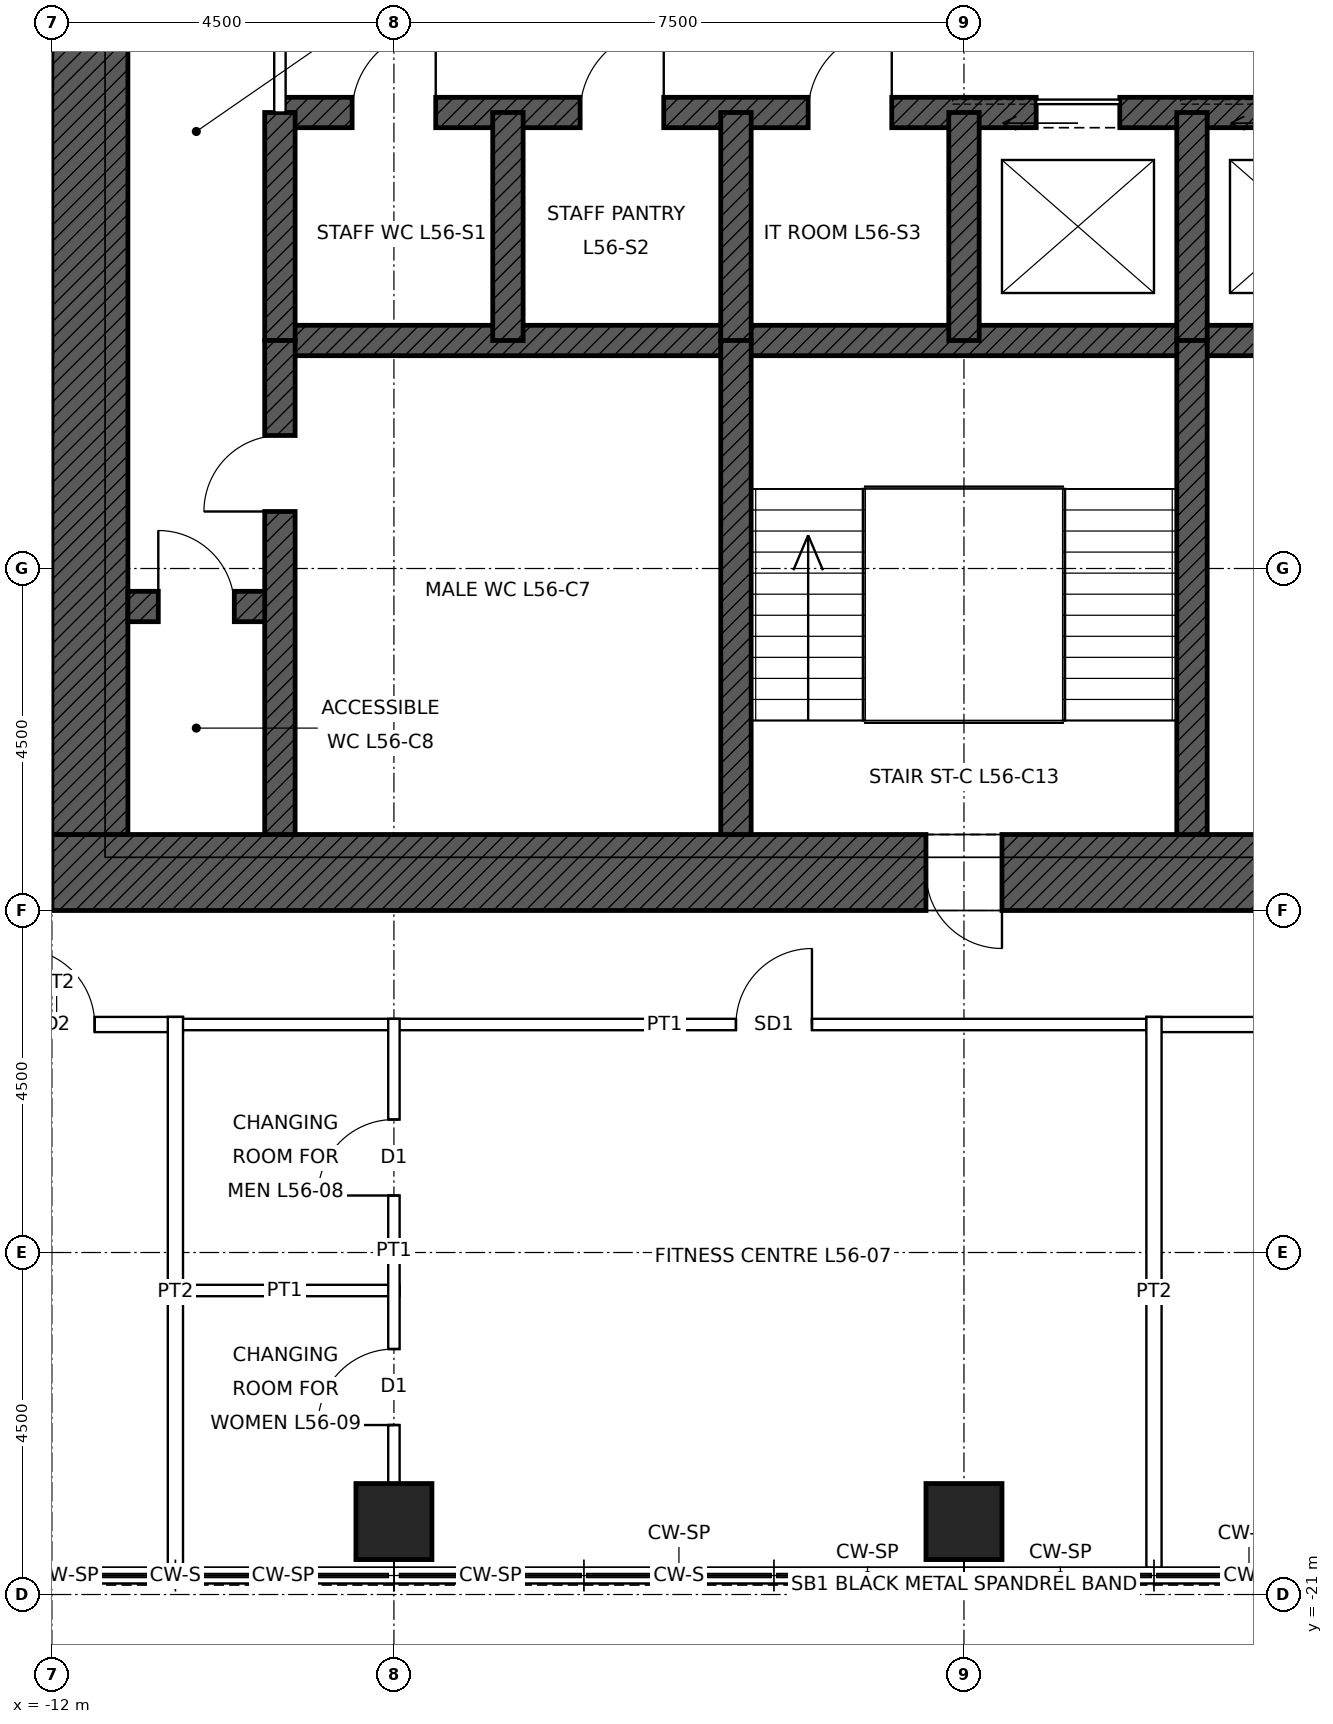
"""IFC4 building model, lengths in metres.
Left out: names, types, materials, properties, quantities, classifications, styles, units other than length and angle.
Written with IfcOpenShell. Run it as: python <this file> out.ifc"""

import sys

from ifc_helpers import new_model, si_unit, direction, frame, frame_2d, origin, origin_2d, place, context, subcontext, project, spatial, rectangle, hollow_rectangle, extrude, element, fill, save


model = new_model("IFC4")
c1 = context("Model", 3, precision=1e-05, world=origin(), true_north=direction((0.0, 1.0)))
c2 = subcontext(c1, "Body", "Model", "MODEL_VIEW")
j1 = project(units=[si_unit("LENGTHUNIT", "METRE"), si_unit("PLANEANGLEUNIT", "RADIAN")], contexts=[c1])
p1 = place(None, origin())
s1 = spatial("IfcSite", under=j1, at=p1, CompositionType="ELEMENT")
p2 = place(p1, origin())
s2 = spatial("IfcBuilding", under=s1, at=p2, CompositionType="ELEMENT")
p3 = place(p2, frame((0.0, 0.0, 259.9)))
s3 = spatial("IfcBuildingStorey", under=s2, at=p3, CompositionType="ELEMENT", Elevation=259.9)
for number, where, z_axis, x_axis in (
    (1, (0.0, -20.04, 0.0), (0.0, 0.0, 1.0), (1.0, 0.0, 0.0)),
    (2, (-7.5, -20.04, 0.0), (0.0, 0.0, 1.0), (1.0, 0.0, 0.0)),
):
    element("IfcColumn", number, at=place(p3, frame(where, z_axis=z_axis, x_axis=x_axis)), inside=s3, PredefinedType="COLUMN", context=c2, shape_type="SweptSolid", body=[
        extrude(hollow_rectangle(XDim=1.0, YDim=1.0, WallThickness=0.075, at=origin_2d()), origin(), (0.0, 0.0, 1.0), 4.0),
    ])
p4 = place(p3, frame((12.0, -11.5, 0.0), z_axis=(0.0, 0.0, 1.0), x_axis=(-1.0, 0.0, 0.0)))
e3 = element("IfcWall", 3, at=p4, inside=s3, PredefinedType="SHEAR", context=c2, shape_type="SweptSolid", body=[
    extrude(rectangle(XDim=24.0, YDim=1.0, at=frame_2d((12.0, 0.0))), origin(), (0.0, 0.0, 1.0), 4.0),
])
p5 = place(p4, frame((11.5, 0.0, 0.0)))
e4 = element("IfcOpeningElement", 4, at=p5, cuts=e3, PredefinedType="OPENING", context=c2, shape_type="SweptSolid", body=[
    extrude(rectangle(XDim=1.0, YDim=2.1, at=frame_2d((0.5, 1.05))), frame((0.0, 0.51, 0.0), z_axis=(0.0, -1.0, 0.0), x_axis=(1.0, 0.0, 0.0)), (0.0, 0.0, 1.0), 1.02),
])
p6 = place(p4, frame((1.0, 0.0, 0.0)))
e5 = element("IfcOpeningElement", 5, at=p6, cuts=e3, PredefinedType="OPENING", context=c2, shape_type="SweptSolid", body=[
    extrude(rectangle(XDim=1.0, YDim=2.4, at=frame_2d((0.5, 1.2))), frame((0.0, 0.51, 0.0), z_axis=(0.0, -1.0, 0.0), x_axis=(1.0, 0.0, 0.0)), (0.0, 0.0, 1.0), 1.02),
])
p7 = place(p3, frame((-11.5, -11.0, 0.0), z_axis=(0.0, 0.0, 1.0), x_axis=(0.0, 1.0, 0.0)))
e6 = element("IfcWall", 6, at=p7, inside=s3, PredefinedType="SHEAR", context=c2, shape_type="SweptSolid", body=[
    extrude(rectangle(XDim=22.0, YDim=1.0, at=frame_2d((11.0, 0.0))), origin(), (0.0, 0.0, 1.0), 4.0),
])
p8 = place(p7, frame((10.5, 0.0, 0.0)))
e7 = element("IfcOpeningElement", 7, at=p8, cuts=e6, PredefinedType="OPENING", context=c2, shape_type="SweptSolid", body=[
    extrude(rectangle(XDim=1.0, YDim=2.4, at=frame_2d((0.5, 1.2))), frame((0.0, 0.51, 0.0), z_axis=(0.0, -1.0, 0.0), x_axis=(1.0, 0.0, 0.0)), (0.0, 0.0, 1.0), 1.02),
])
p9 = place(p3, frame((-9.0, -1.5, 0.0), z_axis=(0.0, 0.0, 1.0), x_axis=(1.0, 0.0, 0.0)))
e8 = element("IfcWall", 8, at=p9, inside=s3, PredefinedType="SHEAR", context=c2, shape_type="SweptSolid", body=[
    extrude(rectangle(XDim=18.0, YDim=0.4, at=frame_2d((9.0, 0.0))), origin(), (0.0, 0.0, 1.0), 4.0),
])
p10 = place(p9, frame((9.95, 0.0, 0.0)))
e9 = element("IfcOpeningElement", 9, at=p10, cuts=e8, PredefinedType="OPENING", context=c2, shape_type="SweptSolid", body=[
    extrude(rectangle(XDim=1.1, YDim=2.1, at=frame_2d((0.55, 1.05))), frame((0.0, 0.21, 0.0), z_axis=(0.0, -1.0, 0.0), x_axis=(1.0, 0.0, 0.0)), (0.0, 0.0, 1.0), 0.42),
])
p11 = place(p9, frame((12.95, 0.0, 0.0)))
e10 = element("IfcOpeningElement", 10, at=p11, cuts=e8, PredefinedType="OPENING", context=c2, shape_type="SweptSolid", body=[
    extrude(rectangle(XDim=1.1, YDim=2.1, at=frame_2d((0.55, 1.05))), frame((0.0, 0.21, 0.0), z_axis=(0.0, -1.0, 0.0), x_axis=(1.0, 0.0, 0.0)), (0.0, 0.0, 1.0), 0.42),
])
p12 = place(p9, frame((15.95, 0.0, 0.0)))
e11 = element("IfcOpeningElement", 11, at=p12, cuts=e8, PredefinedType="OPENING", context=c2, shape_type="SweptSolid", body=[
    extrude(rectangle(XDim=1.1, YDim=2.1, at=frame_2d((0.55, 1.05))), frame((0.0, 0.21, 0.0), z_axis=(0.0, -1.0, 0.0), x_axis=(1.0, 0.0, 0.0)), (0.0, 0.0, 1.0), 0.42),
])
p13 = place(p9, frame((0.95, 0.0, 0.0)))
e12 = element("IfcOpeningElement", 12, at=p13, cuts=e8, PredefinedType="OPENING", context=c2, shape_type="SweptSolid", body=[
    extrude(rectangle(XDim=1.1, YDim=2.1, at=frame_2d((0.55, 1.05))), frame((0.0, 0.21, 0.0), z_axis=(0.0, -1.0, 0.0), x_axis=(1.0, 0.0, 0.0)), (0.0, 0.0, 1.0), 0.42),
])
p14 = place(p9, frame((3.95, 0.0, 0.0)))
e13 = element("IfcOpeningElement", 13, at=p14, cuts=e8, PredefinedType="OPENING", context=c2, shape_type="SweptSolid", body=[
    extrude(rectangle(XDim=1.1, YDim=2.1, at=frame_2d((0.55, 1.05))), frame((0.0, 0.21, 0.0), z_axis=(0.0, -1.0, 0.0), x_axis=(1.0, 0.0, 0.0)), (0.0, 0.0, 1.0), 0.42),
])
p15 = place(p9, frame((6.95, 0.0, 0.0)))
e14 = element("IfcOpeningElement", 14, at=p15, cuts=e8, PredefinedType="OPENING", context=c2, shape_type="SweptSolid", body=[
    extrude(rectangle(XDim=1.1, YDim=2.1, at=frame_2d((0.55, 1.05))), frame((0.0, 0.21, 0.0), z_axis=(0.0, -1.0, 0.0), x_axis=(1.0, 0.0, 0.0)), (0.0, 0.0, 1.0), 0.42),
])
p16 = place(p3, frame((-9.0, -4.5, 0.0), z_axis=(0.0, 0.0, 1.0), x_axis=(1.0, 0.0, 0.0)))
e15 = element("IfcWall", 15, at=p16, inside=s3, PredefinedType="SHEAR", context=c2, shape_type="SweptSolid", body=[
    extrude(rectangle(XDim=18.0, YDim=0.4, at=frame_2d((9.0, 0.0))), origin(), (0.0, 0.0, 1.0), 4.0),
])
p17 = place(p3, frame((-11.0, -8.0, 0.0), z_axis=(0.0, 0.0, 1.0), x_axis=(1.0, 0.0, 0.0)))
e16 = element("IfcWall", 16, at=p17, inside=s3, PredefinedType="SHEAR", context=c2, shape_type="SweptSolid", body=[
    extrude(rectangle(XDim=2.0, YDim=0.4, at=frame_2d((1.0, 0.0))), origin(), (0.0, 0.0, 1.0), 4.0),
])
p18 = place(p17, frame((0.4, 0.0, 0.0)))
e17 = element("IfcOpeningElement", 17, at=p18, cuts=e16, PredefinedType="OPENING", context=c2, shape_type="SweptSolid", body=[
    extrude(rectangle(XDim=1.0, YDim=2.1, at=frame_2d((0.5, 1.05))), frame((0.0, 0.21, 0.0), z_axis=(0.0, -1.0, 0.0), x_axis=(1.0, 0.0, 0.0)), (0.0, 0.0, 1.0), 0.42),
])
for number, where, z_axis, x_axis in (
    (18, (-9.0, -4.5, 0.0), (0.0, 0.0, 1.0), (0.0, 1.0, 0.0)),
    (19, (-6.0, -4.5, 0.0), (0.0, 0.0, 1.0), (0.0, 1.0, 0.0)),
    (20, (-3.0, -4.5, 0.0), (0.0, 0.0, 1.0), (0.0, 1.0, 0.0)),
    (21, (0.0, -4.5, 0.0), (0.0, 0.0, 1.0), (0.0, 1.0, 0.0)),
    (22, (3.0, -4.5, 0.0), (0.0, 0.0, 1.0), (0.0, 1.0, 0.0)),
):
    element("IfcWall", number, at=place(p3, frame(where, z_axis=z_axis, x_axis=x_axis)), inside=s3, PredefinedType="SHEAR", context=c2, shape_type="SweptSolid", body=[
        extrude(rectangle(XDim=3.0, YDim=0.4, at=frame_2d((1.5, 0.0))), origin(), (0.0, 0.0, 1.0), 4.0),
    ])
p19 = place(p3, frame((-9.0, -11.0, 0.0), z_axis=(0.0, 0.0, 1.0), x_axis=(0.0, 1.0, 0.0)))
e23 = element("IfcWall", 23, at=p19, inside=s3, PredefinedType="SHEAR", context=c2, shape_type="SweptSolid", body=[
    extrude(rectangle(XDim=6.5, YDim=0.4, at=frame_2d((3.25, 0.0))), origin(), (0.0, 0.0, 1.0), 4.0),
])
p20 = place(p19, frame((4.25, 0.0, 0.0)))
e24 = element("IfcOpeningElement", 24, at=p20, cuts=e23, PredefinedType="OPENING", context=c2, shape_type="SweptSolid", body=[
    extrude(rectangle(XDim=1.0, YDim=2.1, at=frame_2d((0.5, 1.05))), frame((0.0, 0.21, 0.0), z_axis=(0.0, -1.0, 0.0), x_axis=(1.0, 0.0, 0.0)), (0.0, 0.0, 1.0), 0.42),
])
for number, where, z_axis, x_axis in (
    (25, (-3.0, -11.0, 0.0), (0.0, 0.0, 1.0), (0.0, 1.0, 0.0)),
    (26, (3.0, -11.0, 0.0), (0.0, 0.0, 1.0), (0.0, 1.0, 0.0)),
):
    element("IfcWall", number, at=place(p3, frame(where, z_axis=z_axis, x_axis=x_axis)), inside=s3, PredefinedType="SHEAR", context=c2, shape_type="SweptSolid", body=[
        extrude(rectangle(XDim=6.5, YDim=0.4, at=frame_2d((3.25, 0.0))), origin(), (0.0, 0.0, 1.0), 4.0),
    ])
p21 = place(p3, frame((-10.45, -17.0, 0.0), z_axis=(0.0, 0.0, 1.0), x_axis=(1.0, 0.0, 0.0)))
e27 = element("IfcWall", 27, at=p21, inside=s3, PredefinedType="PARTITIONING", context=c2, shape_type="SweptSolid", body=[
    extrude(rectangle(XDim=3.025, YDim=0.15, at=frame_2d((1.512, 0.0))), origin(), (0.0, 0.0, 1.0), 3.85),
])
p22 = place(p3, frame((-13.6, -13.5, 0.0), z_axis=(0.0, 0.0, 1.0), x_axis=(1.0, 0.0, 0.0)))
e28 = element("IfcWall", 28, at=p22, inside=s3, PredefinedType="PARTITIONING", context=c2, shape_type="SweptSolid", body=[
    extrude(rectangle(XDim=3.325, YDim=0.2, at=frame_2d((1.663, 0.0))), origin(), (0.0, 0.0, 1.0), 3.85),
])
p23 = place(p22, frame((1.163, 0.0, 0.0)))
e29 = element("IfcOpeningElement", 29, at=p23, cuts=e28, PredefinedType="OPENING", context=c2, shape_type="SweptSolid", body=[
    extrude(rectangle(XDim=1.0, YDim=2.1, at=frame_2d((0.5, 1.05))), frame((0.0, 0.11, 0.0), z_axis=(0.0, -1.0, 0.0), x_axis=(1.0, 0.0, 0.0)), (0.0, 0.0, 1.0), 0.22),
])
p24 = place(p3, frame((-10.45, -13.5, 0.0), z_axis=(0.0, 0.0, 1.0), x_axis=(1.0, 0.0, 0.0)))
e30 = element("IfcWall", 30, at=p24, inside=s3, PredefinedType="PARTITIONING", context=c2, shape_type="SweptSolid", body=[
    extrude(rectangle(XDim=13.025, YDim=0.15, at=frame_2d((6.512, 0.0))), origin(), (0.0, 0.0, 1.0), 3.85),
])
p25 = place(p24, frame((7.45, 0.0, 0.0)))
e31 = element("IfcOpeningElement", 31, at=p25, cuts=e30, PredefinedType="OPENING", context=c2, shape_type="SweptSolid", body=[
    extrude(rectangle(XDim=1.0, YDim=2.4, at=frame_2d((0.5, 1.2))), frame((0.0, 0.085, 0.0), z_axis=(0.0, -1.0, 0.0), x_axis=(1.0, 0.0, 0.0)), (0.0, 0.0, 1.0), 0.17),
])
p26 = place(p3, frame((2.4, -13.5, 0.0), z_axis=(0.0, 0.0, 1.0), x_axis=(1.0, 0.0, 0.0)))
e32 = element("IfcWall", 32, at=p26, inside=s3, PredefinedType="PARTITIONING", context=c2, shape_type="SweptSolid", body=[
    extrude(rectangle(XDim=9.7, YDim=0.2, at=frame_2d((4.85, 0.0))), origin(), (0.0, 0.0, 1.0), 3.85),
])
p27 = place(p26, frame((3.538, 0.0, 0.0)))
e33 = element("IfcOpeningElement", 33, at=p27, cuts=e32, PredefinedType="OPENING", context=c2, shape_type="SweptSolid", body=[
    extrude(rectangle(XDim=1.0, YDim=2.1, at=frame_2d((0.5, 1.05))), frame((0.0, 0.11, 0.0), z_axis=(0.0, -1.0, 0.0), x_axis=(1.0, 0.0, 0.0)), (0.0, 0.0, 1.0), 0.22),
])
p28 = place(p3, frame((-10.375, -20.65, 0.0), z_axis=(0.0, 0.0, 1.0), x_axis=(0.0, 1.0, 0.0)))
e34 = element("IfcWall", 34, at=p28, inside=s3, PredefinedType="PARTITIONING", context=c2, shape_type="SweptSolid", body=[
    extrude(rectangle(XDim=7.25, YDim=0.2, at=frame_2d((3.625, 0.0))), origin(), (0.0, 0.0, 1.0), 3.85),
])
p29 = place(p3, frame((-7.5, -19.54, 0.0), z_axis=(0.0, 0.0, 1.0), x_axis=(0.0, 1.0, 0.0)))
e35 = element("IfcWall", 35, at=p29, inside=s3, PredefinedType="PARTITIONING", context=c2, shape_type="SweptSolid", body=[
    extrude(rectangle(XDim=6.115, YDim=0.15, at=frame_2d((3.058, 0.0))), origin(), (0.0, 0.0, 1.0), 3.243),
])
p30 = place(p29, frame((3.79, 0.0, 0.0)))
e36 = element("IfcOpeningElement", 36, at=p30, cuts=e35, PredefinedType="OPENING", context=c2, shape_type="SweptSolid", body=[
    extrude(rectangle(XDim=1.0, YDim=2.1, at=frame_2d((0.5, 1.05))), frame((0.0, 0.085, 0.0), z_axis=(0.0, -1.0, 0.0), x_axis=(1.0, 0.0, 0.0)), (0.0, 0.0, 1.0), 0.17),
])
p31 = place(p29, frame((0.77, 0.0, 0.0)))
e37 = element("IfcOpeningElement", 37, at=p31, cuts=e35, PredefinedType="OPENING", context=c2, shape_type="SweptSolid", body=[
    extrude(rectangle(XDim=1.0, YDim=2.1, at=frame_2d((0.5, 1.05))), frame((0.0, 0.085, 0.0), z_axis=(0.0, -1.0, 0.0), x_axis=(1.0, 0.0, 0.0)), (0.0, 0.0, 1.0), 0.17),
])
p32 = place(p3, frame((2.5, -20.65, 0.0), z_axis=(0.0, 0.0, 1.0), x_axis=(0.0, 1.0, 0.0)))
e38 = element("IfcWall", 38, at=p32, inside=s3, PredefinedType="PARTITIONING", context=c2, shape_type="SweptSolid", body=[
    extrude(rectangle(XDim=7.25, YDim=0.2, at=frame_2d((3.625, 0.0))), origin(), (0.0, 0.0, 1.0), 3.85),
])
p33 = place(p3, frame((-9.0, -1.5, 0.0), z_axis=(0.0, 0.0, 1.0), x_axis=(0.0, 1.0, 0.0)))
e39 = element("IfcWall", 39, at=p33, inside=s3, PredefinedType="PARTITIONING", context=c2, shape_type="SweptSolid", body=[
    extrude(rectangle(XDim=3.0, YDim=0.15, at=frame_2d((1.5, 0.0))), origin(), (0.0, 0.0, 1.0), 3.75),
])
p34 = place(p33, frame((1.0, 0.0, 0.0)))
e40 = element("IfcOpeningElement", 40, at=p34, cuts=e39, PredefinedType="OPENING", context=c2, shape_type="SweptSolid", body=[
    extrude(rectangle(XDim=1.0, YDim=2.4, at=frame_2d((0.5, 1.2))), frame((0.0, 0.085, 0.0), z_axis=(0.0, -1.0, 0.0), x_axis=(1.0, 0.0, 0.0)), (0.0, 0.0, 1.0), 0.17),
])
p35 = place(p5, origin())
e41 = element("IfcDoor", 41, at=p35, inside=s3, OperationType="SINGLE_SWING_LEFT", PredefinedType="DOOR", context=c2, shape_type="SweptSolid", body=[
    extrude(rectangle(XDim=1.0, YDim=2.1, at=frame_2d((0.5, 1.05))), frame((0.0, 0.485, 0.0), z_axis=(0.0, -1.0, 0.0), x_axis=(1.0, 0.0, 0.0)), (0.0, 0.0, 1.0), 0.05),
])
fill(e4, e41)
p36 = place(p20, origin())
e42 = element("IfcDoor", 42, at=p36, inside=s3, OperationType="SINGLE_SWING_LEFT", PredefinedType="DOOR", context=c2, shape_type="SweptSolid", body=[
    extrude(rectangle(XDim=1.0, YDim=2.1, at=frame_2d((0.5, 1.05))), frame((0.0, 0.025, 0.0), z_axis=(0.0, -1.0, 0.0), x_axis=(1.0, 0.0, 0.0)), (0.0, 0.0, 1.0), 0.05),
])
fill(e24, e42)
p37 = place(p18, origin())
e43 = element("IfcDoor", 43, at=p37, inside=s3, OperationType="SINGLE_SWING_LEFT", PredefinedType="DOOR", context=c2, shape_type="SweptSolid", body=[
    extrude(rectangle(XDim=1.0, YDim=2.1, at=frame_2d((0.5, 1.05))), frame((0.0, 0.025, 0.0), z_axis=(0.0, -1.0, 0.0), x_axis=(1.0, 0.0, 0.0)), (0.0, 0.0, 1.0), 0.05),
])
fill(e17, e43)
p38 = place(p10, origin())
e44 = element("IfcDoor", 44, at=p38, inside=s3, OperationType="SLIDING_TO_LEFT", PredefinedType="DOOR", context=c2, shape_type="SweptSolid", body=[
    extrude(rectangle(XDim=1.1, YDim=2.1, at=frame_2d((0.55, 1.05))), frame((0.0, 0.025, 0.0), z_axis=(0.0, -1.0, 0.0), x_axis=(1.0, 0.0, 0.0)), (0.0, 0.0, 1.0), 0.05),
])
fill(e9, e44)
p39 = place(p13, origin())
e45 = element("IfcDoor", 45, at=p39, inside=s3, OperationType="SINGLE_SWING_RIGHT", PredefinedType="DOOR", context=c2, shape_type="SweptSolid", body=[
    extrude(rectangle(XDim=1.1, YDim=2.1, at=frame_2d((0.55, 1.05))), frame((0.0, 0.025, 0.0), z_axis=(0.0, -1.0, 0.0), x_axis=(1.0, 0.0, 0.0)), (0.0, 0.0, 1.0), 0.05),
])
fill(e12, e45)
p40 = place(p14, origin())
e46 = element("IfcDoor", 46, at=p40, inside=s3, OperationType="SINGLE_SWING_RIGHT", PredefinedType="DOOR", context=c2, shape_type="SweptSolid", body=[
    extrude(rectangle(XDim=1.1, YDim=2.1, at=frame_2d((0.55, 1.05))), frame((0.0, 0.025, 0.0), z_axis=(0.0, -1.0, 0.0), x_axis=(1.0, 0.0, 0.0)), (0.0, 0.0, 1.0), 0.05),
])
fill(e13, e46)
p41 = place(p15, origin())
e47 = element("IfcDoor", 47, at=p41, inside=s3, OperationType="SINGLE_SWING_RIGHT", PredefinedType="DOOR", context=c2, shape_type="SweptSolid", body=[
    extrude(rectangle(XDim=1.1, YDim=2.1, at=frame_2d((0.55, 1.05))), frame((0.0, 0.025, 0.0), z_axis=(0.0, -1.0, 0.0), x_axis=(1.0, 0.0, 0.0)), (0.0, 0.0, 1.0), 0.05),
])
fill(e14, e47)
p42 = place(p25, origin())
e48 = element("IfcDoor", 48, at=p42, inside=s3, OperationType="SINGLE_SWING_RIGHT", PredefinedType="DOOR", context=c2, shape_type="SweptSolid", body=[
    extrude(rectangle(XDim=1.0, YDim=2.4, at=frame_2d((0.5, 1.2))), frame((0.0, 0.025, 0.0), z_axis=(0.0, -1.0, 0.0), x_axis=(1.0, 0.0, 0.0)), (0.0, 0.0, 1.0), 0.05),
])
fill(e31, e48)
p43 = place(p30, origin())
e49 = element("IfcDoor", 49, at=p43, inside=s3, OperationType="SINGLE_SWING_LEFT", PredefinedType="DOOR", context=c2, shape_type="SweptSolid", body=[
    extrude(rectangle(XDim=1.0, YDim=2.1, at=frame_2d((0.5, 1.05))), frame((0.0, 0.025, 0.0), z_axis=(0.0, -1.0, 0.0), x_axis=(1.0, 0.0, 0.0)), (0.0, 0.0, 1.0), 0.05),
])
fill(e36, e49)
p44 = place(p31, origin())
e50 = element("IfcDoor", 50, at=p44, inside=s3, OperationType="SINGLE_SWING_LEFT", PredefinedType="DOOR", context=c2, shape_type="SweptSolid", body=[
    extrude(rectangle(XDim=1.0, YDim=2.1, at=frame_2d((0.5, 1.05))), frame((0.0, 0.025, 0.0), z_axis=(0.0, -1.0, 0.0), x_axis=(1.0, 0.0, 0.0)), (0.0, 0.0, 1.0), 0.05),
])
fill(e37, e50)
p45 = place(p23, origin())
e51 = element("IfcDoor", 51, at=p45, inside=s3, OperationType="SINGLE_SWING_LEFT", PredefinedType="DOOR", context=c2, shape_type="SweptSolid", body=[
    extrude(rectangle(XDim=1.0, YDim=2.1, at=frame_2d((0.5, 1.05))), frame((0.0, 0.025, 0.0), z_axis=(0.0, -1.0, 0.0), x_axis=(1.0, 0.0, 0.0)), (0.0, 0.0, 1.0), 0.05),
])
fill(e29, e51)
save(model, sys.argv[1])
